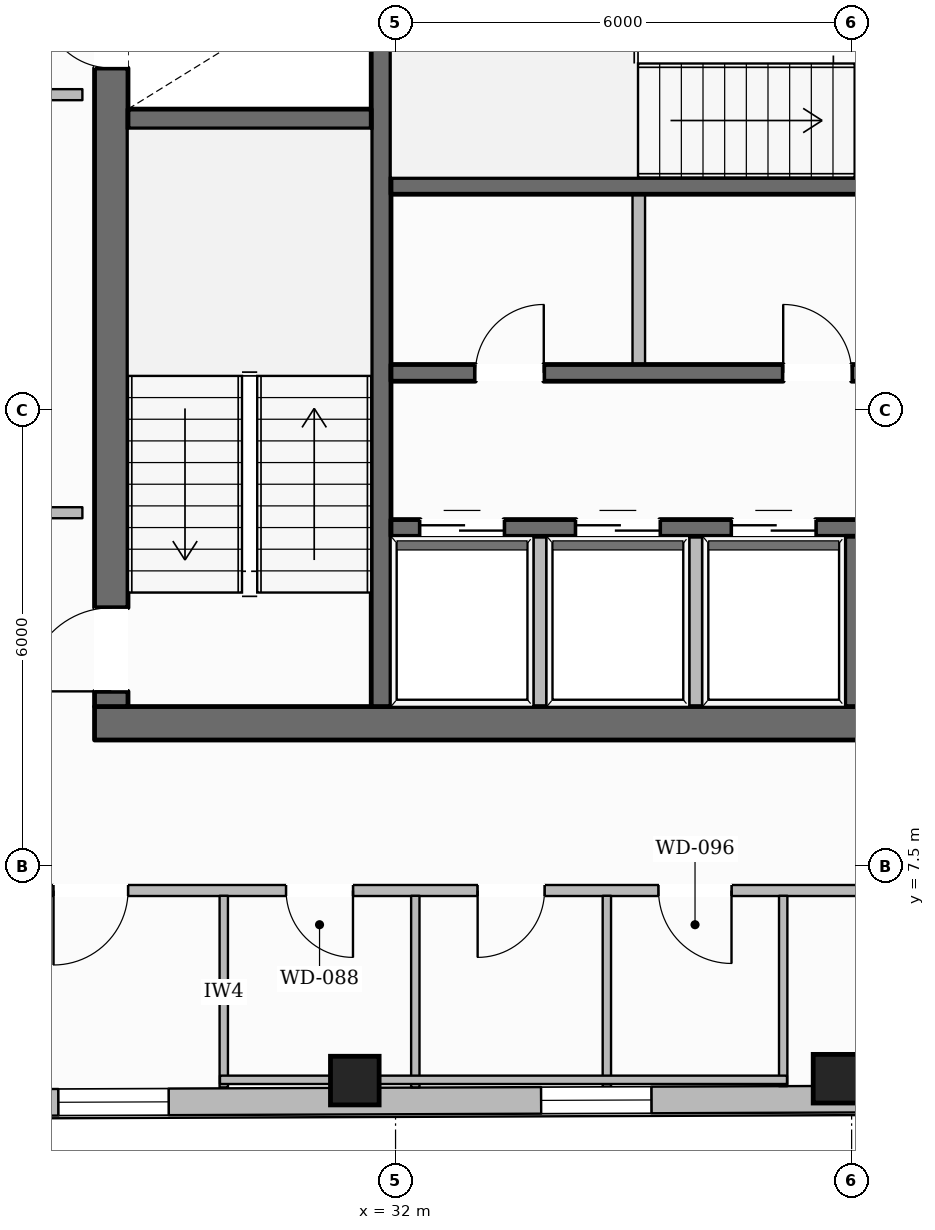
"""IFC4 building model, lengths in metres.
Left out: names, types, materials, properties, quantities, classifications, styles, units other than length and angle.
Written with IfcOpenShell. Run it as: python <this file> out.ifc"""

import sys

from ifc_helpers import new_model, si_unit, direction, frame, frame_2d, origin, origin_2d, place, context, subcontext, project, spatial, rectangle, hollow_rectangle, extrude, element, fill, save


model = new_model("IFC4")
c1 = context("Model", 3, precision=1e-05, world=origin(), true_north=direction((0.0, 1.0)))
c2 = subcontext(c1, "Body", "Model", "MODEL_VIEW")
j1 = project(units=[si_unit("LENGTHUNIT", "METRE"), si_unit("PLANEANGLEUNIT", "RADIAN")], contexts=[c1])
p1 = place(None, origin())
s1 = spatial("IfcSite", under=j1, at=p1, CompositionType="ELEMENT")
p2 = place(p1, origin())
s2 = spatial("IfcBuilding", under=s1, at=p2, CompositionType="ELEMENT")
p3 = place(p2, frame((0.0, 0.0, 230.45)))
s3 = spatial("IfcBuildingStorey", under=s2, at=p3, CompositionType="ELEMENT", Elevation=230.45)
p4 = place(p3, frame((28.04, 9.38, 0.0), z_axis=(0.0, 0.0, 1.0), x_axis=(1.0, 0.0, 0.0)))
e1 = element("IfcWall", 1, at=p4, inside=s3, PredefinedType="SOLIDWALL", context=c2, shape_type="SweptSolid", body=[
    extrude(rectangle(XDim=19.92, YDim=0.44, at=frame_2d((9.96, 0.0))), origin(), (0.0, 0.0, 1.0), 3.43),
])
p5 = place(p4, frame((10.46, 0.0, 0.0)))
e2 = element("IfcOpeningElement", 2, at=p5, cuts=e1, PredefinedType="OPENING", context=c2, shape_type="SweptSolid", body=[
    extrude(rectangle(XDim=1.4, YDim=2.2, at=frame_2d((0.7, 1.1))), frame((0.0, 0.23, 0.0), z_axis=(0.0, -1.0, 0.0), x_axis=(1.0, 0.0, 0.0)), (0.0, 0.0, 1.0), 0.46),
])
p6 = place(p3, frame((28.26, 9.6, 0.0), z_axis=(0.0, 0.0, 1.0), x_axis=(0.0, 1.0, 0.0)))
e3 = element("IfcWall", 3, at=p6, inside=s3, PredefinedType="SOLIDWALL", context=c2, shape_type="SweptSolid", body=[
    extrude(rectangle(XDim=13.0, YDim=0.44, at=frame_2d((6.5, 0.0))), origin(), (0.0, 0.0, 1.0), 3.43),
])
p7 = place(p6, frame((0.2, 0.0, 0.0)))
e4 = element("IfcOpeningElement", 4, at=p7, cuts=e3, PredefinedType="OPENING", context=c2, shape_type="SweptSolid", body=[
    extrude(rectangle(XDim=1.1, YDim=2.15, at=frame_2d((0.55, 1.075))), frame((0.0, 0.23, 0.0), z_axis=(0.0, -1.0, 0.0), x_axis=(1.0, 0.0, 0.0)), (0.0, 0.0, 1.0), 0.46),
])
p8 = place(p6, frame((8.4, 0.0, 0.0)))
e5 = element("IfcOpeningElement", 5, at=p8, cuts=e3, PredefinedType="OPENING", context=c2, shape_type="SweptSolid", body=[
    extrude(rectangle(XDim=0.9, YDim=2.1, at=frame_2d((0.45, 1.05))), frame((0.0, 0.23, 0.0), z_axis=(0.0, -1.0, 0.0), x_axis=(1.0, 0.0, 0.0)), (0.0, 0.0, 1.0), 0.46),
])
p9 = place(p3, frame((31.81, 9.6, 0.0), z_axis=(0.0, 0.0, 1.0), x_axis=(0.0, 1.0, 0.0)))
e6 = element("IfcWall", 6, at=p9, inside=s3, PredefinedType="SHEAR", context=c2, shape_type="SweptSolid", body=[
    extrude(rectangle(XDim=13.0, YDim=0.26, at=frame_2d((6.5, 0.0))), origin(), (0.0, 0.0, 1.0), 3.43),
])
p10 = place(p9, frame((10.925, 0.0, 0.0)))
e7 = element("IfcOpeningElement", 7, at=p10, cuts=e6, PredefinedType="OPENING", context=c2, shape_type="SweptSolid", body=[
    extrude(rectangle(XDim=1.25, YDim=2.25, at=frame_2d((0.625, 1.125))), frame((0.0, 0.14, 0.0), z_axis=(0.0, -1.0, 0.0), x_axis=(1.0, 0.0, 0.0)), (0.0, 0.0, 1.0), 0.28),
])
p11 = place(p3, frame((28.48, 17.33, 0.0), z_axis=(0.0, 0.0, 1.0), x_axis=(1.0, 0.0, 0.0)))
e8 = element("IfcWall", 8, at=p11, inside=s3, PredefinedType="SHEAR", context=c2, shape_type="SweptSolid", body=[
    extrude(rectangle(XDim=3.2, YDim=0.26, at=frame_2d((1.6, 0.0))), origin(), (0.0, 0.0, 1.0), 3.43),
])
p12 = place(p3, frame((31.94, 16.45, 0.0), z_axis=(0.0, 0.0, 1.0), x_axis=(1.0, 0.0, 0.0)))
e9 = element("IfcWall", 9, at=p12, inside=s3, PredefinedType="SOLIDWALL", context=c2, shape_type="SweptSolid", body=[
    extrude(rectangle(XDim=12.12, YDim=0.22, at=frame_2d((6.06, 0.0))), origin(), (0.0, 0.0, 1.0), 3.43),
])
p13 = place(p3, frame((31.94, 13.99, 0.0), z_axis=(0.0, 0.0, 1.0), x_axis=(1.0, 0.0, 0.0)))
e10 = element("IfcWall", 10, at=p13, inside=s3, PredefinedType="SOLIDWALL", context=c2, shape_type="SweptSolid", body=[
    extrude(rectangle(XDim=12.12, YDim=0.22, at=frame_2d((6.06, 0.0))), origin(), (0.0, 0.0, 1.0), 3.43),
])
p14 = place(p13, frame((1.11, 0.0, 0.0)))
e11 = element("IfcOpeningElement", 11, at=p14, cuts=e10, PredefinedType="OPENING", context=c2, shape_type="SweptSolid", body=[
    extrude(rectangle(XDim=0.9, YDim=2.1, at=frame_2d((0.45, 1.05))), frame((0.0, 0.12, 0.0), z_axis=(0.0, -1.0, 0.0), x_axis=(1.0, 0.0, 0.0)), (0.0, 0.0, 1.0), 0.24),
])
p15 = place(p13, frame((5.16, 0.0, 0.0)))
e12 = element("IfcOpeningElement", 12, at=p15, cuts=e10, PredefinedType="OPENING", context=c2, shape_type="SweptSolid", body=[
    extrude(rectangle(XDim=0.9, YDim=2.1, at=frame_2d((0.45, 1.05))), frame((0.0, 0.12, 0.0), z_axis=(0.0, -1.0, 0.0), x_axis=(1.0, 0.0, 0.0)), (0.0, 0.0, 1.0), 0.24),
])
p16 = place(p13, frame((9.61, 0.0, 0.0)))
e13 = element("IfcOpeningElement", 13, at=p16, cuts=e10, PredefinedType="OPENING", context=c2, shape_type="SweptSolid", body=[
    extrude(rectangle(XDim=0.9, YDim=2.1, at=frame_2d((0.45, 1.05))), frame((0.0, 0.12, 0.0), z_axis=(0.0, -1.0, 0.0), x_axis=(1.0, 0.0, 0.0)), (0.0, 0.0, 1.0), 0.24),
])
p17 = place(p3, frame((31.94, 11.95, 0.0), z_axis=(0.0, 0.0, 1.0), x_axis=(1.0, 0.0, 0.0)))
e14 = element("IfcWall", 14, at=p17, inside=s3, PredefinedType="SOLIDWALL", context=c2, shape_type="SweptSolid", body=[
    extrude(rectangle(XDim=6.19, YDim=0.22, at=frame_2d((3.095, 0.0))), origin(), (0.0, 0.0, 1.0), 3.43),
])
p18 = place(p17, frame((0.385, 0.0, 0.0)))
e15 = element("IfcOpeningElement", 15, at=p18, cuts=e14, PredefinedType="OPENING", context=c2, shape_type="SweptSolid", body=[
    extrude(rectangle(XDim=1.1, YDim=2.2, at=frame_2d((0.55, 1.1))), frame((0.0, 0.12, 0.0), z_axis=(0.0, -1.0, 0.0), x_axis=(1.0, 0.0, 0.0)), (0.0, 0.0, 1.0), 0.24),
])
p19 = place(p17, frame((2.435, 0.0, 0.0)))
e16 = element("IfcOpeningElement", 16, at=p19, cuts=e14, PredefinedType="OPENING", context=c2, shape_type="SweptSolid", body=[
    extrude(rectangle(XDim=1.1, YDim=2.2, at=frame_2d((0.55, 1.1))), frame((0.0, 0.12, 0.0), z_axis=(0.0, -1.0, 0.0), x_axis=(1.0, 0.0, 0.0)), (0.0, 0.0, 1.0), 0.24),
])
p20 = place(p17, frame((4.485, 0.0, 0.0)))
e17 = element("IfcOpeningElement", 17, at=p20, cuts=e14, PredefinedType="OPENING", context=c2, shape_type="SweptSolid", body=[
    extrude(rectangle(XDim=1.1, YDim=2.2, at=frame_2d((0.55, 1.1))), frame((0.0, 0.12, 0.0), z_axis=(0.0, -1.0, 0.0), x_axis=(1.0, 0.0, 0.0)), (0.0, 0.0, 1.0), 0.24),
])
p21 = place(p3, frame((38.02, 9.6, 0.0), z_axis=(0.0, 0.0, 1.0), x_axis=(0.0, 1.0, 0.0)))
e18 = element("IfcWall", 18, at=p21, inside=s3, PredefinedType="SOLIDWALL", context=c2, shape_type="SweptSolid", body=[
    extrude(rectangle(XDim=2.24, YDim=0.22, at=frame_2d((1.12, 0.0))), origin(), (0.0, 0.0, 1.0), 3.43),
])
for number, where, z_axis, x_axis in (
    (19, (31.464, 4.679, 0.0), (0.0, 0.0, 1.0), (1.0, 0.0, 0.0)),
    (20, (37.815, 4.704, 0.0), (0.0, 0.0, 1.0), (1.0, 0.0, 0.0)),
):
    element("IfcColumn", number, at=place(p3, frame(where, z_axis=z_axis, x_axis=x_axis)), inside=s3, PredefinedType="COLUMN", context=c2, shape_type="SweptSolid", body=[
        extrude(hollow_rectangle(XDim=0.64, YDim=0.64, WallThickness=0.028, at=origin_2d()), origin(), (0.0, 0.0, 1.0), 3.43),
    ])
p22 = place(p3, frame((14.597, 10.907, 0.0), z_axis=(0.0, 0.0, 1.0), x_axis=(0.494693460531, 0.869067534837, 0.0)))
e21 = element("IfcWall", 21, at=p22, inside=s3, PredefinedType="STANDARD", context=c2, shape_type="SweptSolid", body=[
    extrude(rectangle(XDim=39.744, YDim=0.35, at=frame_2d((19.872, 0.0))), origin(), (0.0, 0.0, 1.0), 2.962),
])
p23 = place(p22, frame((35.308, 0.0, 0.55)))
e22 = element("IfcOpeningElement", 22, at=p23, cuts=e21, PredefinedType="OPENING", context=c2, shape_type="SweptSolid", body=[
    extrude(rectangle(XDim=1.45, YDim=1.6, at=frame_2d((0.725, 0.8))), frame((0.0, 0.185, 0.0), z_axis=(0.0, -1.0, 0.0), x_axis=(1.0, 0.0, 0.0)), (0.0, 0.0, 1.0), 0.37),
])
p24 = place(p22, frame((28.843, 0.0, 0.55)))
e23 = element("IfcOpeningElement", 23, at=p24, cuts=e21, PredefinedType="OPENING", context=c2, shape_type="SweptSolid", body=[
    extrude(rectangle(XDim=1.45, YDim=1.6, at=frame_2d((0.725, 0.8))), frame((0.0, 0.185, 0.0), z_axis=(0.0, -1.0, 0.0), x_axis=(1.0, 0.0, 0.0)), (0.0, 0.0, 1.0), 0.37),
])
p25 = place(p22, frame((22.377, 0.0, 0.55)))
e24 = element("IfcOpeningElement", 24, at=p25, cuts=e21, PredefinedType="OPENING", context=c2, shape_type="SweptSolid", body=[
    extrude(rectangle(XDim=1.45, YDim=1.6, at=frame_2d((0.725, 0.8))), frame((0.0, 0.185, 0.0), z_axis=(0.0, -1.0, 0.0), x_axis=(1.0, 0.0, 0.0)), (0.0, 0.0, 1.0), 0.37),
])
p26 = place(p22, frame((9.446, 0.0, 0.55)))
e25 = element("IfcOpeningElement", 25, at=p26, cuts=e21, PredefinedType="OPENING", context=c2, shape_type="SweptSolid", body=[
    extrude(rectangle(XDim=1.45, YDim=1.6, at=frame_2d((0.725, 0.8))), frame((0.0, 0.185, 0.0), z_axis=(0.0, -1.0, 0.0), x_axis=(1.0, 0.0, 0.0)), (0.0, 0.0, 1.0), 0.37),
])
p27 = place(p22, frame((2.98, 0.0, 0.55)))
e26 = element("IfcOpeningElement", 26, at=p27, cuts=e21, PredefinedType="OPENING", context=c2, shape_type="SweptSolid", body=[
    extrude(rectangle(XDim=1.45, YDim=1.6, at=frame_2d((0.725, 0.8))), frame((0.0, 0.185, 0.0), z_axis=(0.0, -1.0, 0.0), x_axis=(1.0, 0.0, 0.0)), (0.0, 0.0, 1.0), 0.37),
])
p28 = place(p3, frame((57.346, 4.51, 0.0), z_axis=(0.0, 0.0, 1.0), x_axis=(-0.999992347121, -0.003912249994, 0.0)))
e27 = element("IfcWall", 27, at=p28, inside=s3, PredefinedType="STANDARD", context=c2, shape_type="SweptSolid", body=[
    extrude(rectangle(XDim=39.065, YDim=0.35, at=frame_2d((19.532, 0.0))), origin(), (0.0, 0.0, 1.0), 2.962),
])
p29 = place(p28, frame((9.366, 0.0, 0.0)))
e28 = element("IfcOpeningElement", 28, at=p29, cuts=e27, PredefinedType="OPENING", context=c2, shape_type="SweptSolid", body=[
    extrude(rectangle(XDim=1.0, YDim=2.2, at=frame_2d((0.5, 1.1))), frame((0.0, 0.185, 0.0), z_axis=(0.0, -1.0, 0.0), x_axis=(1.0, 0.0, 0.0)), (0.0, 0.0, 1.0), 0.37),
])
p30 = place(p28, frame((34.683, 0.0, 0.55)))
e29 = element("IfcOpeningElement", 29, at=p30, cuts=e27, PredefinedType="OPENING", context=c2, shape_type="SweptSolid", body=[
    extrude(rectangle(XDim=1.45, YDim=1.6, at=frame_2d((0.725, 0.8))), frame((0.0, 0.185, 0.0), z_axis=(0.0, -1.0, 0.0), x_axis=(1.0, 0.0, 0.0)), (0.0, 0.0, 1.0), 0.37),
])
p31 = place(p28, frame((28.332, 0.0, 0.55)))
e30 = element("IfcOpeningElement", 30, at=p31, cuts=e27, PredefinedType="OPENING", context=c2, shape_type="SweptSolid", body=[
    extrude(rectangle(XDim=1.45, YDim=1.6, at=frame_2d((0.725, 0.8))), frame((0.0, 0.185, 0.0), z_axis=(0.0, -1.0, 0.0), x_axis=(1.0, 0.0, 0.0)), (0.0, 0.0, 1.0), 0.37),
])
p32 = place(p28, frame((21.981, 0.0, 0.55)))
e31 = element("IfcOpeningElement", 31, at=p32, cuts=e27, PredefinedType="OPENING", context=c2, shape_type="SweptSolid", body=[
    extrude(rectangle(XDim=1.45, YDim=1.6, at=frame_2d((0.725, 0.8))), frame((0.0, 0.185, 0.0), z_axis=(0.0, -1.0, 0.0), x_axis=(1.0, 0.0, 0.0)), (0.0, 0.0, 1.0), 0.37),
])
p33 = place(p28, frame((2.928, 0.0, 0.55)))
e32 = element("IfcOpeningElement", 32, at=p33, cuts=e27, PredefinedType="OPENING", context=c2, shape_type="SweptSolid", body=[
    extrude(rectangle(XDim=1.45, YDim=1.6, at=frame_2d((0.725, 0.8))), frame((0.0, 0.185, 0.0), z_axis=(0.0, -1.0, 0.0), x_axis=(1.0, 0.0, 0.0)), (0.0, 0.0, 1.0), 0.37),
])
for number, where, z_axis, x_axis in (
    (33, (33.9, 9.52, 0.0), (0.0, 0.0, 1.0), (0.0, 1.0, 0.0)),
    (34, (35.95, 9.52, 0.0), (0.0, 0.0, 1.0), (0.0, 1.0, 0.0)),
):
    element("IfcWall", number, at=place(p3, frame(where, z_axis=z_axis, x_axis=x_axis)), inside=s3, PredefinedType="PARTITIONING", context=c2, shape_type="SweptSolid", body=[
        extrude(rectangle(XDim=2.32, YDim=0.165, at=frame_2d((1.16, 0.0))), origin(), (0.0, 0.0, 1.0), 3.43),
    ])
p34 = place(p3, frame((35.2, 14.1, 0.0), z_axis=(0.0, 0.0, 1.0), x_axis=(0.0, 1.0, 0.0)))
e35 = element("IfcWall", 35, at=p34, inside=s3, PredefinedType="PARTITIONING", context=c2, shape_type="SweptSolid", body=[
    extrude(rectangle(XDim=2.24, YDim=0.165, at=frame_2d((1.12, 0.0))), origin(), (0.0, 0.0, 1.0), 3.43),
])
p35 = place(p3, frame((27.88, 17.65, 0.0), z_axis=(0.0, 0.0, 1.0), x_axis=(-1.0, 0.0, 0.0)))
e36 = element("IfcWall", 36, at=p35, inside=s3, PredefinedType="PARTITIONING", context=c2, shape_type="SweptSolid", body=[
    extrude(rectangle(XDim=1.82, YDim=0.145, at=frame_2d((0.91, 0.0))), origin(), (0.0, 0.0, 1.0), 3.43),
])
p36 = place(p3, frame((49.94, 7.18, 0.0), z_axis=(0.0, 0.0, 1.0), x_axis=(-1.0, 0.0, 0.0)))
e37 = element("IfcWall", 37, at=p36, inside=s3, PredefinedType="PARTITIONING", context=c2, shape_type="SweptSolid", body=[
    extrude(rectangle(XDim=23.88, YDim=0.145, at=frame_2d((11.94, 0.0))), origin(), (0.0, 0.0, 1.0), 3.169),
])
p37 = place(p36, frame((18.5, 0.0, 0.0)))
e38 = element("IfcOpeningElement", 38, at=p37, cuts=e37, PredefinedType="OPENING", context=c2, shape_type="SweptSolid", body=[
    extrude(rectangle(XDim=0.88, YDim=2.1, at=frame_2d((0.44, 1.05))), frame((0.0, 0.083, 0.0), z_axis=(0.0, -1.0, 0.0), x_axis=(1.0, 0.0, 0.0)), (0.0, 0.0, 1.0), 0.165),
])
p38 = place(p36, frame((15.98, 0.0, 0.0)))
e39 = element("IfcOpeningElement", 39, at=p38, cuts=e37, PredefinedType="OPENING", context=c2, shape_type="SweptSolid", body=[
    extrude(rectangle(XDim=0.88, YDim=2.1, at=frame_2d((0.44, 1.05))), frame((0.0, 0.083, 0.0), z_axis=(0.0, -1.0, 0.0), x_axis=(1.0, 0.0, 0.0)), (0.0, 0.0, 1.0), 0.165),
])
p39 = place(p36, frame((13.52, 0.0, 0.0)))
e40 = element("IfcOpeningElement", 40, at=p39, cuts=e37, PredefinedType="OPENING", context=c2, shape_type="SweptSolid", body=[
    extrude(rectangle(XDim=0.96, YDim=2.1, at=frame_2d((0.48, 1.05))), frame((0.0, 0.083, 0.0), z_axis=(0.0, -1.0, 0.0), x_axis=(1.0, 0.0, 0.0)), (0.0, 0.0, 1.0), 0.165),
])
p40 = place(p36, frame((21.459, 0.0, 0.0)))
e41 = element("IfcOpeningElement", 41, at=p40, cuts=e37, PredefinedType="OPENING", context=c2, shape_type="SweptSolid", body=[
    extrude(rectangle(XDim=0.98, YDim=2.15, at=frame_2d((0.49, 1.075))), frame((0.0, 0.083, 0.0), z_axis=(0.0, -1.0, 0.0), x_axis=(1.0, 0.0, 0.0)), (0.0, 0.0, 1.0), 0.165),
])
p41 = place(p36, frame((6.99, 0.0, 0.0)))
e42 = element("IfcOpeningElement", 42, at=p41, cuts=e37, PredefinedType="OPENING", context=c2, shape_type="SweptSolid", body=[
    extrude(rectangle(XDim=0.98, YDim=2.15, at=frame_2d((0.49, 1.075))), frame((0.0, 0.083, 0.0), z_axis=(0.0, -1.0, 0.0), x_axis=(1.0, 0.0, 0.0)), (0.0, 0.0, 1.0), 0.165),
])
p42 = place(p3, frame((26.06, 12.15, 0.0), z_axis=(0.0, 0.0, 1.0), x_axis=(1.0, 0.0, 0.0)))
e43 = element("IfcWall", 43, at=p42, inside=s3, PredefinedType="PARTITIONING", context=c2, shape_type="SweptSolid", body=[
    extrude(rectangle(XDim=1.82, YDim=0.145, at=frame_2d((0.91, 0.0))), origin(), (0.0, 0.0, 1.0), 3.43),
])
for number, where, z_axis, x_axis in (
    (44, (29.74, 4.589, 0.0), (0.0, 0.0, 1.0), (0.0, 1.0, 0.0)),
    (45, (32.26, 4.589, 0.0), (0.0, 0.0, 1.0), (0.0, 1.0, 0.0)),
):
    element("IfcWall", number, at=place(p3, frame(where, z_axis=z_axis, x_axis=x_axis)), inside=s3, PredefinedType="PLUMBINGWALL", context=c2, shape_type="SweptSolid", body=[
        extrude(rectangle(XDim=2.521, YDim=0.11, at=frame_2d((1.26, 0.0))), origin(), (0.0, 0.0, 1.0), 3.43),
    ])
p43 = place(p3, frame((34.78, 4.597, 0.0), z_axis=(0.0, 0.0, 1.0), x_axis=(0.0, 1.0, 0.0)))
e46 = element("IfcWall", 46, at=p43, inside=s3, PredefinedType="PLUMBINGWALL", context=c2, shape_type="SweptSolid", body=[
    extrude(rectangle(XDim=2.513, YDim=0.11, at=frame_2d((1.256, 0.0))), origin(), (0.0, 0.0, 1.0), 3.43),
])
p44 = place(p3, frame((37.1, 4.606, 0.0), z_axis=(0.0, 0.0, 1.0), x_axis=(0.0, 1.0, 0.0)))
e47 = element("IfcWall", 47, at=p44, inside=s3, PredefinedType="PLUMBINGWALL", context=c2, shape_type="SweptSolid", body=[
    extrude(rectangle(XDim=2.504, YDim=0.11, at=frame_2d((1.252, 0.0))), origin(), (0.0, 0.0, 1.0), 3.43),
])
p45 = place(p3, frame((29.69, 4.689, 0.0), z_axis=(0.0, 0.0, 1.0), x_axis=(1.0, 0.0, 0.0)))
e48 = element("IfcWall", 48, at=p45, inside=s3, PredefinedType="PLUMBINGWALL", context=c2, shape_type="SweptSolid", body=[
    extrude(rectangle(XDim=7.46, YDim=0.11, at=frame_2d((3.73, 0.0))), origin(), (0.0, 0.0, 1.0), 2.965),
])
p46 = place(p31, origin())
e49 = element("IfcWindow", 49, at=p46, inside=s3, PartitioningType="SINGLE_PANEL", PredefinedType="WINDOW", context=c2, shape_type="SweptSolid", body=[
    extrude(rectangle(XDim=1.45, YDim=1.6, at=frame_2d((0.725, 0.8))), frame((0.0, 0.03, 0.0), z_axis=(0.0, -1.0, 0.0), x_axis=(1.0, 0.0, 0.0)), (0.0, 0.0, 1.0), 0.06),
])
fill(e30, e49)
p47 = place(p32, origin())
e50 = element("IfcWindow", 50, at=p47, inside=s3, PartitioningType="SINGLE_PANEL", PredefinedType="WINDOW", context=c2, shape_type="SweptSolid", body=[
    extrude(rectangle(XDim=1.45, YDim=1.6, at=frame_2d((0.725, 0.8))), frame((0.0, 0.03, 0.0), z_axis=(0.0, -1.0, 0.0), x_axis=(1.0, 0.0, 0.0)), (0.0, 0.0, 1.0), 0.06),
])
fill(e31, e50)
p48 = place(p7, origin())
e51 = element("IfcDoor", 51, at=p48, inside=s3, OperationType="SINGLE_SWING_LEFT", PredefinedType="DOOR", context=c2, shape_type="SweptSolid", body=[
    extrude(rectangle(XDim=1.1, YDim=2.15, at=frame_2d((0.55, 1.075))), frame((0.0, 0.025, 0.0), z_axis=(0.0, -1.0, 0.0), x_axis=(1.0, 0.0, 0.0)), (0.0, 0.0, 1.0), 0.05),
])
fill(e4, e51)
p49 = place(p8, origin())
e52 = element("IfcDoor", 52, at=p49, inside=s3, OperationType="SINGLE_SWING_RIGHT", PredefinedType="DOOR", context=c2, shape_type="SweptSolid", body=[
    extrude(rectangle(XDim=0.9, YDim=2.1, at=frame_2d((0.45, 1.05))), frame((0.0, 0.025, 0.0), z_axis=(0.0, -1.0, 0.0), x_axis=(1.0, 0.0, 0.0)), (0.0, 0.0, 1.0), 0.05),
])
fill(e5, e52)
p50 = place(p18, origin())
e53 = element("IfcDoor", 53, at=p50, inside=s3, OperationType="DOUBLE_DOOR_SLIDING", PredefinedType="DOOR", context=c2, shape_type="SweptSolid", body=[
    extrude(rectangle(XDim=1.1, YDim=2.2, at=frame_2d((0.55, 1.1))), frame((0.0, 0.025, 0.0), z_axis=(0.0, -1.0, 0.0), x_axis=(1.0, 0.0, 0.0)), (0.0, 0.0, 1.0), 0.05),
])
fill(e15, e53)
p51 = place(p19, origin())
e54 = element("IfcDoor", 54, at=p51, inside=s3, OperationType="DOUBLE_DOOR_SLIDING", PredefinedType="DOOR", context=c2, shape_type="SweptSolid", body=[
    extrude(rectangle(XDim=1.1, YDim=2.2, at=frame_2d((0.55, 1.1))), frame((0.0, 0.025, 0.0), z_axis=(0.0, -1.0, 0.0), x_axis=(1.0, 0.0, 0.0)), (0.0, 0.0, 1.0), 0.05),
])
fill(e16, e54)
p52 = place(p20, origin())
e55 = element("IfcDoor", 55, at=p52, inside=s3, OperationType="DOUBLE_DOOR_SLIDING", PredefinedType="DOOR", context=c2, shape_type="SweptSolid", body=[
    extrude(rectangle(XDim=1.1, YDim=2.2, at=frame_2d((0.55, 1.1))), frame((0.0, 0.025, 0.0), z_axis=(0.0, -1.0, 0.0), x_axis=(1.0, 0.0, 0.0)), (0.0, 0.0, 1.0), 0.05),
])
fill(e17, e55)
p53 = place(p14, origin())
e56 = element("IfcDoor", 56, at=p53, inside=s3, OperationType="SINGLE_SWING_RIGHT", PredefinedType="DOOR", context=c2, shape_type="SweptSolid", body=[
    extrude(rectangle(XDim=0.9, YDim=2.1, at=frame_2d((0.45, 1.05))), frame((0.0, 0.025, 0.0), z_axis=(0.0, -1.0, 0.0), x_axis=(1.0, 0.0, 0.0)), (0.0, 0.0, 1.0), 0.05),
])
fill(e11, e56)
p54 = place(p15, origin())
e57 = element("IfcDoor", 57, at=p54, inside=s3, OperationType="SINGLE_SWING_LEFT", PredefinedType="DOOR", context=c2, shape_type="SweptSolid", body=[
    extrude(rectangle(XDim=0.9, YDim=2.1, at=frame_2d((0.45, 1.05))), frame((0.0, 0.025, 0.0), z_axis=(0.0, -1.0, 0.0), x_axis=(1.0, 0.0, 0.0)), (0.0, 0.0, 1.0), 0.05),
])
fill(e12, e57)
p55 = place(p37, origin())
e58 = element("IfcDoor", 58, at=p55, inside=s3, OperationType="SINGLE_SWING_LEFT", PredefinedType="DOOR", context=c2, shape_type="SweptSolid", body=[
    extrude(rectangle(XDim=0.88, YDim=2.1, at=frame_2d((0.44, 1.05))), frame((0.0, 0.025, 0.0), z_axis=(0.0, -1.0, 0.0), x_axis=(1.0, 0.0, 0.0)), (0.0, 0.0, 1.0), 0.05),
])
fill(e38, e58)
p56 = place(p38, origin())
e59 = element("IfcDoor", 59, at=p56, inside=s3, OperationType="SINGLE_SWING_RIGHT", PredefinedType="DOOR", context=c2, shape_type="SweptSolid", body=[
    extrude(rectangle(XDim=0.88, YDim=2.1, at=frame_2d((0.44, 1.05))), frame((0.0, 0.025, 0.0), z_axis=(0.0, -1.0, 0.0), x_axis=(1.0, 0.0, 0.0)), (0.0, 0.0, 1.0), 0.05),
])
fill(e39, e59)
p57 = place(p39, origin())
e60 = element("IfcDoor", 60, at=p57, inside=s3, OperationType="SINGLE_SWING_LEFT", PredefinedType="DOOR", context=c2, shape_type="SweptSolid", body=[
    extrude(rectangle(XDim=0.96, YDim=2.1, at=frame_2d((0.48, 1.05))), frame((0.0, 0.025, 0.0), z_axis=(0.0, -1.0, 0.0), x_axis=(1.0, 0.0, 0.0)), (0.0, 0.0, 1.0), 0.05),
])
fill(e40, e60)
p58 = place(p40, origin())
e61 = element("IfcDoor", 61, at=p58, inside=s3, OperationType="SINGLE_SWING_RIGHT", PredefinedType="DOOR", context=c2, shape_type="SweptSolid", body=[
    extrude(rectangle(XDim=0.98, YDim=2.15, at=frame_2d((0.49, 1.075))), frame((0.0, 0.025, 0.0), z_axis=(0.0, -1.0, 0.0), x_axis=(1.0, 0.0, 0.0)), (0.0, 0.0, 1.0), 0.05),
])
fill(e41, e61)
save(model, sys.argv[1])
